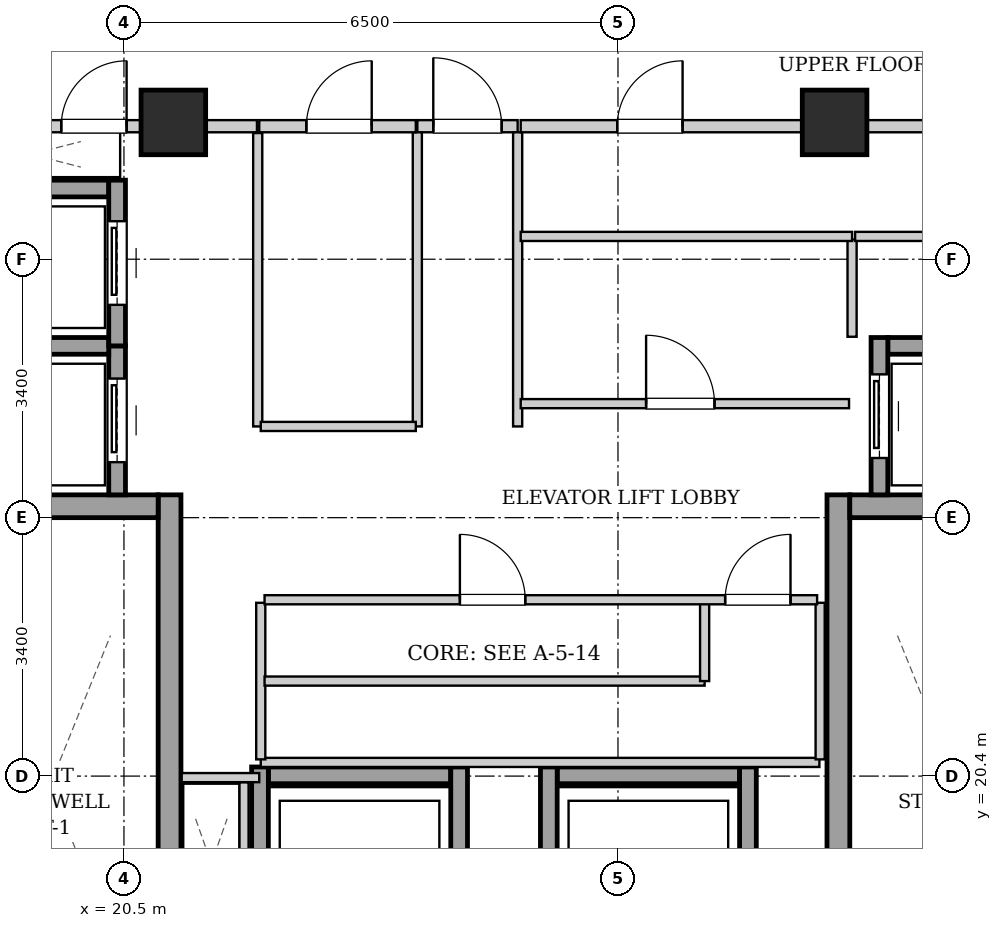
"""IFC4 building model, lengths in metres.
Left out: names, types, materials, properties, quantities, classifications, styles, units other than length and angle.
Written with IfcOpenShell. Run it as: python <this file> out.ifc"""

import sys

from ifc_helpers import new_model, si_unit, direction, frame, frame_2d, origin, origin_2d, place, context, subcontext, project, spatial, rectangle, extrude, element, fill, save


model = new_model("IFC4")
c1 = context("Model", 3, precision=1e-05, world=origin(), true_north=direction((0.0, 1.0)))
c2 = subcontext(c1, "Body", "Model", "MODEL_VIEW")
j1 = project(units=[si_unit("LENGTHUNIT", "METRE"), si_unit("PLANEANGLEUNIT", "RADIAN")], contexts=[c1])
p1 = place(None, origin())
s1 = spatial("IfcSite", under=j1, at=p1, CompositionType="ELEMENT")
p2 = place(p1, origin())
s2 = spatial("IfcBuilding", under=s1, at=p2, CompositionType="ELEMENT")
p3 = place(p2, frame((0.0, 0.0, 200.8)))
s3 = spatial("IfcBuildingStorey", under=s2, at=p3, CompositionType="ELEMENT", Elevation=200.8)
for number, where, z_axis, x_axis in (
    (1, (21.15, 29.0, 0.0), (0.0, 0.0, 1.0), (1.0, 0.0, 0.0)),
    (2, (29.85, 29.0, 0.0), (0.0, 0.0, 1.0), (1.0, 0.0, 0.0)),
):
    element("IfcColumn", number, at=place(p3, frame(where, z_axis=z_axis, x_axis=x_axis)), inside=s3, PredefinedType="COLUMN", context=c2, shape_type="SweptSolid", body=[
        extrude(rectangle(XDim=0.85, YDim=0.85, at=origin_2d()), origin(), (0.0, 0.0, 1.0), 3.3),
    ])
p4 = place(p3, frame((21.1, 15.1, 0.0), z_axis=(0.0, 0.0, 1.0), x_axis=(0.0, 1.0, 0.0)))
e3 = element("IfcWall", 3, at=p4, inside=s3, PredefinedType="SHEAR", context=c2, shape_type="SweptSolid", body=[
    extrude(rectangle(XDim=9.0, YDim=0.3, at=frame_2d((4.5, 0.0))), origin(), (0.0, 0.0, 1.0), 3.04),
])
p5 = place(p3, frame((18.1, 23.95, 0.0), z_axis=(0.0, 0.0, 1.0), x_axis=(1.0, 0.0, 0.0)))
e4 = element("IfcWall", 4, at=p5, inside=s3, PredefinedType="SHEAR", context=c2, shape_type="SweptSolid", body=[
    extrude(rectangle(XDim=2.85, YDim=0.3, at=frame_2d((1.425, 0.0))), origin(), (0.0, 0.0, 1.0), 3.04),
])
p6 = place(p3, frame((29.9, 15.1, 0.0), z_axis=(0.0, 0.0, 1.0), x_axis=(0.0, 1.0, 0.0)))
e5 = element("IfcWall", 5, at=p6, inside=s3, PredefinedType="SHEAR", context=c2, shape_type="SweptSolid", body=[
    extrude(rectangle(XDim=9.0, YDim=0.3, at=frame_2d((4.5, 0.0))), origin(), (0.0, 0.0, 1.0), 3.04),
])
p7 = place(p3, frame((30.05, 23.95, 0.0), z_axis=(0.0, 0.0, 1.0), x_axis=(1.0, 0.0, 0.0)))
e6 = element("IfcWall", 6, at=p7, inside=s3, PredefinedType="SHEAR", context=c2, shape_type="SweptSolid", body=[
    extrude(rectangle(XDim=2.85, YDim=0.3, at=frame_2d((1.425, 0.0))), origin(), (0.0, 0.0, 1.0), 3.04),
])
p8 = place(p3, frame((20.41, 24.1, 0.0), z_axis=(0.0, 0.0, 1.0), x_axis=(0.0, 1.0, 0.0)))
e7 = element("IfcWall", 7, at=p8, inside=s3, PredefinedType="SHEAR", context=c2, shape_type="SweptSolid", body=[
    extrude(rectangle(XDim=1.96, YDim=0.22, at=frame_2d((0.98, 0.0))), origin(), (0.0, 0.0, 1.0), 3.04),
])
p9 = place(p8, frame((0.43, 0.0, 0.0)))
e8 = element("IfcOpeningElement", 8, at=p9, cuts=e7, PredefinedType="OPENING", context=c2, shape_type="SweptSolid", body=[
    extrude(rectangle(XDim=1.1, YDim=2.15, at=frame_2d((0.55, 1.075))), frame((0.0, 0.12, 0.0), z_axis=(0.0, -1.0, 0.0), x_axis=(1.0, 0.0, 0.0)), (0.0, 0.0, 1.0), 0.24),
])
for number, where, z_axis, x_axis in (
    (9, (18.4, 26.06, 0.0), (0.0, 0.0, 1.0), (1.0, 0.0, 0.0)),
    (10, (18.4, 28.13, 0.0), (0.0, 0.0, 1.0), (1.0, 0.0, 0.0)),
):
    element("IfcWall", number, at=place(p3, frame(where, z_axis=z_axis, x_axis=x_axis)), inside=s3, PredefinedType="SHEAR", context=c2, shape_type="SweptSolid", body=[
        extrude(rectangle(XDim=1.9, YDim=0.22, at=frame_2d((0.95, 0.0))), origin(), (0.0, 0.0, 1.0), 3.04),
    ])
p10 = place(p3, frame((20.41, 26.06, 0.0), z_axis=(0.0, 0.0, 1.0), x_axis=(0.0, 1.0, 0.0)))
e11 = element("IfcWall", 11, at=p10, inside=s3, PredefinedType="SHEAR", context=c2, shape_type="SweptSolid", body=[
    extrude(rectangle(XDim=2.18, YDim=0.22, at=frame_2d((1.09, 0.0))), origin(), (0.0, 0.0, 1.0), 3.04),
])
p11 = place(p10, frame((0.54, 0.0, 0.0)))
e12 = element("IfcOpeningElement", 12, at=p11, cuts=e11, PredefinedType="OPENING", context=c2, shape_type="SweptSolid", body=[
    extrude(rectangle(XDim=1.1, YDim=2.15, at=frame_2d((0.55, 1.075))), frame((0.0, 0.12, 0.0), z_axis=(0.0, -1.0, 0.0), x_axis=(1.0, 0.0, 0.0)), (0.0, 0.0, 1.0), 0.24),
])
p12 = place(p3, frame((30.55, 26.06, 0.0), z_axis=(0.0, 0.0, 1.0), x_axis=(1.0, 0.0, 0.0)))
e13 = element("IfcWall", 13, at=p12, inside=s3, PredefinedType="SHEAR", context=c2, shape_type="SweptSolid", body=[
    extrude(rectangle(XDim=1.9, YDim=0.22, at=frame_2d((0.95, 0.0))), origin(), (0.0, 0.0, 1.0), 3.04),
])
p13 = place(p3, frame((30.44, 24.1, 0.0), z_axis=(0.0, 0.0, 1.0), x_axis=(0.0, 1.0, 0.0)))
e14 = element("IfcWall", 14, at=p13, inside=s3, PredefinedType="SHEAR", context=c2, shape_type="SweptSolid", body=[
    extrude(rectangle(XDim=2.07, YDim=0.22, at=frame_2d((1.035, 0.0))), origin(), (0.0, 0.0, 1.0), 3.04),
])
p14 = place(p13, frame((0.485, 0.0, 0.0)))
e15 = element("IfcOpeningElement", 15, at=p14, cuts=e14, PredefinedType="OPENING", context=c2, shape_type="SweptSolid", body=[
    extrude(rectangle(XDim=1.1, YDim=2.15, at=frame_2d((0.55, 1.075))), frame((0.0, 0.12, 0.0), z_axis=(0.0, -1.0, 0.0), x_axis=(1.0, 0.0, 0.0)), (0.0, 0.0, 1.0), 0.24),
])
p15 = place(p3, frame((22.4, 20.41, 0.0), z_axis=(0.0, 0.0, 1.0), x_axis=(1.0, 0.0, 0.0)))
e16 = element("IfcWall", 16, at=p15, inside=s3, PredefinedType="SHEAR", context=c2, shape_type="SweptSolid", body=[
    extrude(rectangle(XDim=2.4, YDim=0.22, at=frame_2d((1.2, 0.0))), origin(), (0.0, 0.0, 1.0), 3.04),
])
for number, where, z_axis, x_axis in (
    (17, (22.29, 17.98, 0.0), (0.0, 0.0, 1.0), (0.0, 1.0, 0.0)),
    (18, (24.91, 17.98, 0.0), (0.0, 0.0, 1.0), (0.0, 1.0, 0.0)),
):
    element("IfcWall", number, at=place(p3, frame(where, z_axis=z_axis, x_axis=x_axis)), inside=s3, PredefinedType="SHEAR", context=c2, shape_type="SweptSolid", body=[
        extrude(rectangle(XDim=2.54, YDim=0.22, at=frame_2d((1.27, 0.0))), origin(), (0.0, 0.0, 1.0), 3.04),
    ])
p16 = place(p3, frame((26.2, 20.41, 0.0), z_axis=(0.0, 0.0, 1.0), x_axis=(1.0, 0.0, 0.0)))
e19 = element("IfcWall", 19, at=p16, inside=s3, PredefinedType="SHEAR", context=c2, shape_type="SweptSolid", body=[
    extrude(rectangle(XDim=2.4, YDim=0.22, at=frame_2d((1.2, 0.0))), origin(), (0.0, 0.0, 1.0), 3.04),
])
for number, where, z_axis, x_axis in (
    (20, (26.09, 17.98, 0.0), (0.0, 0.0, 1.0), (0.0, 1.0, 0.0)),
    (21, (28.71, 17.98, 0.0), (0.0, 0.0, 1.0), (0.0, 1.0, 0.0)),
):
    element("IfcWall", number, at=place(p3, frame(where, z_axis=z_axis, x_axis=x_axis)), inside=s3, PredefinedType="SHEAR", context=c2, shape_type="SweptSolid", body=[
        extrude(rectangle(XDim=2.54, YDim=0.22, at=frame_2d((1.27, 0.0))), origin(), (0.0, 0.0, 1.0), 3.04),
    ])
p17 = place(p3, frame((24.36, 28.95, 0.0), z_axis=(0.0, 0.0, 1.0), x_axis=(1.0, 0.0, 0.0)))
e22 = element("IfcWall", 22, at=p17, inside=s3, PredefinedType="PARTITIONING", context=c2, shape_type="SweptSolid", body=[
    extrude(rectangle(XDim=1.32, YDim=0.16, at=frame_2d((0.66, 0.0))), origin(), (0.0, 0.0, 1.0), 2.556),
])
p18 = place(p17, frame((0.21, 0.0, 0.0)))
e23 = element("IfcOpeningElement", 23, at=p18, cuts=e22, PredefinedType="OPENING", context=c2, shape_type="SweptSolid", body=[
    extrude(rectangle(XDim=0.9, YDim=2.05, at=frame_2d((0.45, 1.025))), frame((0.0, 0.09, 0.0), z_axis=(0.0, -1.0, 0.0), x_axis=(1.0, 0.0, 0.0)), (0.0, 0.0, 1.0), 0.18),
])
p19 = place(p3, frame((17.96, 28.95, 0.0), z_axis=(0.0, 0.0, 1.0), x_axis=(1.0, 0.0, 0.0)))
e24 = element("IfcWall", 24, at=p19, inside=s3, PredefinedType="PARTITIONING", context=c2, shape_type="SweptSolid", body=[
    extrude(rectangle(XDim=4.29, YDim=0.16, at=frame_2d((2.145, 0.0))), origin(), (0.0, 0.0, 1.0), 2.556),
])
p20 = place(p19, frame((1.715, 0.0, 0.0)))
e25 = element("IfcOpeningElement", 25, at=p20, cuts=e24, PredefinedType="OPENING", context=c2, shape_type="SweptSolid", body=[
    extrude(rectangle(XDim=0.86, YDim=2.05, at=frame_2d((0.43, 1.025))), frame((0.0, 0.09, 0.0), z_axis=(0.0, -1.0, 0.0), x_axis=(1.0, 0.0, 0.0)), (0.0, 0.0, 1.0), 0.18),
])
p21 = place(p3, frame((22.08, 18.2, 0.0), z_axis=(0.0, 0.0, 1.0), x_axis=(0.0, 1.0, 0.0)))
e26 = element("IfcWall", 26, at=p21, inside=s3, PredefinedType="PARTITIONING", context=c2, shape_type="SweptSolid", body=[
    extrude(rectangle(XDim=2.12, YDim=0.12, at=frame_2d((1.06, 0.0))), origin(), (0.0, 0.0, 1.0), 3.04),
])
p22 = place(p3, frame((22.28, 20.38, 0.0), z_axis=(0.0, 0.0, 1.0), x_axis=(-1.0, 0.0, 0.0)))
e27 = element("IfcWall", 27, at=p22, inside=s3, PredefinedType="PARTITIONING", context=c2, shape_type="SweptSolid", body=[
    extrude(rectangle(XDim=1.02, YDim=0.12, at=frame_2d((0.51, 0.0))), origin(), (0.0, 0.0, 1.0), 3.04),
])
for number, where, z_axis, x_axis in (
    (28, (24.36, 25.0, 0.0), (0.0, 0.0, 1.0), (0.0, 1.0, 0.0)),
    (29, (25.68, 25.0, 0.0), (0.0, 0.0, 1.0), (0.0, 1.0, 0.0)),
):
    element("IfcWall", number, at=place(p3, frame(where, z_axis=z_axis, x_axis=x_axis)), inside=s3, PredefinedType="PARTITIONING", context=c2, shape_type="SweptSolid", body=[
        extrude(rectangle(XDim=3.87, YDim=0.12, at=frame_2d((1.935, 0.0))), origin(), (0.0, 0.0, 1.0), 3.04),
    ])
p23 = place(p3, frame((30.08, 26.18, 0.0), z_axis=(0.0, 0.0, 1.0), x_axis=(0.0, 1.0, 0.0)))
e30 = element("IfcWall", 30, at=p23, inside=s3, PredefinedType="PARTITIONING", context=c2, shape_type="SweptSolid", body=[
    extrude(rectangle(XDim=1.28, YDim=0.12, at=frame_2d((0.64, 0.0))), origin(), (0.0, 0.0, 1.0), 3.04),
])
p24 = place(p3, frame((30.12, 27.5, 0.0), z_axis=(0.0, 0.0, 1.0), x_axis=(1.0, 0.0, 0.0)))
e31 = element("IfcWall", 31, at=p24, inside=s3, PredefinedType="PARTITIONING", context=c2, shape_type="SweptSolid", body=[
    extrude(rectangle(XDim=2.92, YDim=0.12, at=frame_2d((1.46, 0.0))), origin(), (0.0, 0.0, 1.0), 3.04),
])
p25 = place(p24, frame((0.97, 0.0, 0.0)))
e32 = element("IfcOpeningElement", 32, at=p25, cuts=e31, PredefinedType="OPENING", context=c2, shape_type="SweptSolid", body=[
    extrude(rectangle(XDim=0.86, YDim=2.05, at=frame_2d((0.43, 1.025))), frame((0.0, 0.07, 0.0), z_axis=(0.0, -1.0, 0.0), x_axis=(1.0, 0.0, 0.0)), (0.0, 0.0, 1.0), 0.14),
])
p26 = place(p3, frame((22.26, 25.0, 0.0), z_axis=(0.0, 0.0, 1.0), x_axis=(0.0, 1.0, 0.0)))
e33 = element("IfcWall", 33, at=p26, inside=s3, PredefinedType="PARTITIONING", context=c2, shape_type="SweptSolid", body=[
    extrude(rectangle(XDim=3.86, YDim=0.12, at=frame_2d((1.93, 0.0))), origin(), (0.0, 0.0, 1.0), 3.04),
])
p27 = place(p3, frame((22.3, 25.0, 0.0), z_axis=(0.0, 0.0, 1.0), x_axis=(1.0, 0.0, 0.0)))
e34 = element("IfcWall", 34, at=p27, inside=s3, PredefinedType="PARTITIONING", context=c2, shape_type="SweptSolid", body=[
    extrude(rectangle(XDim=2.04, YDim=0.12, at=frame_2d((1.02, 0.0))), origin(), (0.0, 0.0, 1.0), 3.04),
])
p28 = place(p3, frame((22.28, 28.95, 0.0), z_axis=(0.0, 0.0, 1.0), x_axis=(1.0, 0.0, 0.0)))
e35 = element("IfcWall", 35, at=p28, inside=s3, PredefinedType="PARTITIONING", context=c2, shape_type="SweptSolid", body=[
    extrude(rectangle(XDim=2.06, YDim=0.16, at=frame_2d((1.03, 0.0))), origin(), (0.0, 0.0, 1.0), 2.556),
])
p29 = place(p28, frame((0.62, 0.0, 0.0)))
e36 = element("IfcOpeningElement", 36, at=p29, cuts=e35, PredefinedType="OPENING", context=c2, shape_type="SweptSolid", body=[
    extrude(rectangle(XDim=0.86, YDim=2.05, at=frame_2d((0.43, 1.025))), frame((0.0, 0.09, 0.0), z_axis=(0.0, -1.0, 0.0), x_axis=(1.0, 0.0, 0.0)), (0.0, 0.0, 1.0), 0.18),
])
p30 = place(p3, frame((25.72, 27.5, 0.0), z_axis=(0.0, 0.0, 1.0), x_axis=(1.0, 0.0, 0.0)))
e37 = element("IfcWall", 37, at=p30, inside=s3, PredefinedType="PARTITIONING", context=c2, shape_type="SweptSolid", body=[
    extrude(rectangle(XDim=4.36, YDim=0.12, at=frame_2d((2.18, 0.0))), origin(), (0.0, 0.0, 1.0), 3.04),
])
p31 = place(p3, frame((25.72, 25.3, 0.0), z_axis=(0.0, 0.0, 1.0), x_axis=(1.0, 0.0, 0.0)))
e38 = element("IfcWall", 38, at=p31, inside=s3, PredefinedType="PARTITIONING", context=c2, shape_type="SweptSolid", body=[
    extrude(rectangle(XDim=4.32, YDim=0.12, at=frame_2d((2.16, 0.0))), origin(), (0.0, 0.0, 1.0), 3.04),
])
p32 = place(p31, frame((1.65, 0.0, 0.0)))
e39 = element("IfcOpeningElement", 39, at=p32, cuts=e38, PredefinedType="OPENING", context=c2, shape_type="SweptSolid", body=[
    extrude(rectangle(XDim=0.9, YDim=2.05, at=frame_2d((0.45, 1.025))), frame((0.0, 0.07, 0.0), z_axis=(0.0, -1.0, 0.0), x_axis=(1.0, 0.0, 0.0)), (0.0, 0.0, 1.0), 0.14),
])
p33 = place(p3, frame((25.72, 28.95, 0.0), z_axis=(0.0, 0.0, 1.0), x_axis=(1.0, 0.0, 0.0)))
e40 = element("IfcWall", 40, at=p33, inside=s3, PredefinedType="PARTITIONING", context=c2, shape_type="SweptSolid", body=[
    extrude(rectangle(XDim=7.32, YDim=0.16, at=frame_2d((3.66, 0.0))), origin(), (0.0, 0.0, 1.0), 2.556),
])
p34 = place(p33, frame((1.27, 0.0, 0.0)))
e41 = element("IfcOpeningElement", 41, at=p34, cuts=e40, PredefinedType="OPENING", context=c2, shape_type="SweptSolid", body=[
    extrude(rectangle(XDim=0.86, YDim=2.05, at=frame_2d((0.43, 1.025))), frame((0.0, 0.09, 0.0), z_axis=(0.0, -1.0, 0.0), x_axis=(1.0, 0.0, 0.0)), (0.0, 0.0, 1.0), 0.18),
])
p35 = place(p3, frame((22.3, 20.58, 0.0), z_axis=(0.0, 0.0, 1.0), x_axis=(1.0, 0.0, 0.0)))
e42 = element("IfcWall", 42, at=p35, inside=s3, PredefinedType="PARTITIONING", context=c2, shape_type="SweptSolid", body=[
    extrude(rectangle(XDim=7.35, YDim=0.12, at=frame_2d((3.675, 0.0))), origin(), (0.0, 0.0, 1.0), 3.04),
])
for number, where, z_axis, x_axis in (
    (43, (22.3, 20.62, 0.0), (0.0, 0.0, 1.0), (0.0, 1.0, 0.0)),
    (44, (29.66, 20.62, 0.0), (0.0, 0.0, 1.0), (0.0, 1.0, 0.0)),
):
    element("IfcWall", number, at=place(p3, frame(where, z_axis=z_axis, x_axis=x_axis)), inside=s3, PredefinedType="PARTITIONING", context=c2, shape_type="SweptSolid", body=[
        extrude(rectangle(XDim=2.06, YDim=0.12, at=frame_2d((1.03, 0.0))), origin(), (0.0, 0.0, 1.0), 3.04),
    ])
p36 = place(p3, frame((22.35, 21.65, 0.0), z_axis=(0.0, 0.0, 1.0), x_axis=(1.0, 0.0, 0.0)))
e45 = element("IfcWall", 45, at=p36, inside=s3, PredefinedType="PARTITIONING", context=c2, shape_type="SweptSolid", body=[
    extrude(rectangle(XDim=5.79, YDim=0.12, at=frame_2d((2.895, 0.0))), origin(), (0.0, 0.0, 1.0), 3.04),
])
p37 = place(p3, frame((28.14, 21.65, 0.0), z_axis=(0.0, 0.0, 1.0), x_axis=(0.0, 1.0, 0.0)))
e46 = element("IfcWall", 46, at=p37, inside=s3, PredefinedType="PARTITIONING", context=c2, shape_type="SweptSolid", body=[
    extrude(rectangle(XDim=1.03, YDim=0.12, at=frame_2d((0.515, 0.0))), origin(), (0.0, 0.0, 1.0), 3.04),
])
p38 = place(p3, frame((22.35, 22.72, 0.0), z_axis=(0.0, 0.0, 1.0), x_axis=(1.0, 0.0, 0.0)))
e47 = element("IfcWall", 47, at=p38, inside=s3, PredefinedType="PARTITIONING", context=c2, shape_type="SweptSolid", body=[
    extrude(rectangle(XDim=7.27, YDim=0.12, at=frame_2d((3.635, 0.0))), origin(), (0.0, 0.0, 1.0), 3.04),
])
p39 = place(p38, frame((2.57, 0.0, 0.0)))
e48 = element("IfcOpeningElement", 48, at=p39, cuts=e47, PredefinedType="OPENING", context=c2, shape_type="SweptSolid", body=[
    extrude(rectangle(XDim=0.86, YDim=2.05, at=frame_2d((0.43, 1.025))), frame((0.0, 0.07, 0.0), z_axis=(0.0, -1.0, 0.0), x_axis=(1.0, 0.0, 0.0)), (0.0, 0.0, 1.0), 0.14),
])
p40 = place(p38, frame((6.06, 0.0, 0.0)))
e49 = element("IfcOpeningElement", 49, at=p40, cuts=e47, PredefinedType="OPENING", context=c2, shape_type="SweptSolid", body=[
    extrude(rectangle(XDim=0.86, YDim=2.05, at=frame_2d((0.43, 1.025))), frame((0.0, 0.07, 0.0), z_axis=(0.0, -1.0, 0.0), x_axis=(1.0, 0.0, 0.0)), (0.0, 0.0, 1.0), 0.14),
])
p41 = place(p9, origin())
e50 = element("IfcDoor", 50, at=p41, inside=s3, OperationType="SLIDING_TO_LEFT", PredefinedType="DOOR", context=c2, shape_type="SweptSolid", body=[
    extrude(rectangle(XDim=1.1, YDim=2.15, at=frame_2d((0.55, 1.075))), frame((0.0, 0.025, 0.0), z_axis=(0.0, -1.0, 0.0), x_axis=(1.0, 0.0, 0.0)), (0.0, 0.0, 1.0), 0.05),
])
fill(e8, e50)
p42 = place(p11, origin())
e51 = element("IfcDoor", 51, at=p42, inside=s3, OperationType="SLIDING_TO_LEFT", PredefinedType="DOOR", context=c2, shape_type="SweptSolid", body=[
    extrude(rectangle(XDim=1.1, YDim=2.15, at=frame_2d((0.55, 1.075))), frame((0.0, 0.025, 0.0), z_axis=(0.0, -1.0, 0.0), x_axis=(1.0, 0.0, 0.0)), (0.0, 0.0, 1.0), 0.05),
])
fill(e12, e51)
p43 = place(p14, origin())
e52 = element("IfcDoor", 52, at=p43, inside=s3, OperationType="SLIDING_TO_LEFT", PredefinedType="DOOR", context=c2, shape_type="SweptSolid", body=[
    extrude(rectangle(XDim=1.1, YDim=2.15, at=frame_2d((0.55, 1.075))), frame((0.0, 0.025, 0.0), z_axis=(0.0, -1.0, 0.0), x_axis=(1.0, 0.0, 0.0)), (0.0, 0.0, 1.0), 0.05),
])
fill(e15, e52)
p44 = place(p18, origin())
e53 = element("IfcDoor", 53, at=p44, inside=s3, OperationType="SINGLE_SWING_LEFT", PredefinedType="DOOR", context=c2, shape_type="SweptSolid", body=[
    extrude(rectangle(XDim=0.9, YDim=2.05, at=frame_2d((0.45, 1.025))), frame((0.0, 0.025, 0.0), z_axis=(0.0, -1.0, 0.0), x_axis=(1.0, 0.0, 0.0)), (0.0, 0.0, 1.0), 0.05),
])
fill(e23, e53)
p45 = place(p20, origin())
e54 = element("IfcDoor", 54, at=p45, inside=s3, OperationType="SINGLE_SWING_RIGHT", PredefinedType="DOOR", context=c2, shape_type="SweptSolid", body=[
    extrude(rectangle(XDim=0.86, YDim=2.05, at=frame_2d((0.43, 1.025))), frame((0.0, 0.025, 0.0), z_axis=(0.0, -1.0, 0.0), x_axis=(1.0, 0.0, 0.0)), (0.0, 0.0, 1.0), 0.05),
])
fill(e25, e54)
p46 = place(p29, origin())
e55 = element("IfcDoor", 55, at=p46, inside=s3, OperationType="SINGLE_SWING_RIGHT", PredefinedType="DOOR", context=c2, shape_type="SweptSolid", body=[
    extrude(rectangle(XDim=0.86, YDim=2.05, at=frame_2d((0.43, 1.025))), frame((0.0, 0.025, 0.0), z_axis=(0.0, -1.0, 0.0), x_axis=(1.0, 0.0, 0.0)), (0.0, 0.0, 1.0), 0.05),
])
fill(e36, e55)
p47 = place(p32, origin())
e56 = element("IfcDoor", 56, at=p47, inside=s3, OperationType="SINGLE_SWING_LEFT", PredefinedType="DOOR", context=c2, shape_type="SweptSolid", body=[
    extrude(rectangle(XDim=0.9, YDim=2.05, at=frame_2d((0.45, 1.025))), frame((0.0, 0.025, 0.0), z_axis=(0.0, -1.0, 0.0), x_axis=(1.0, 0.0, 0.0)), (0.0, 0.0, 1.0), 0.05),
])
fill(e39, e56)
p48 = place(p34, origin())
e57 = element("IfcDoor", 57, at=p48, inside=s3, OperationType="SINGLE_SWING_RIGHT", PredefinedType="DOOR", context=c2, shape_type="SweptSolid", body=[
    extrude(rectangle(XDim=0.86, YDim=2.05, at=frame_2d((0.43, 1.025))), frame((0.0, 0.025, 0.0), z_axis=(0.0, -1.0, 0.0), x_axis=(1.0, 0.0, 0.0)), (0.0, 0.0, 1.0), 0.05),
])
fill(e41, e57)
p49 = place(p39, origin())
e58 = element("IfcDoor", 58, at=p49, inside=s3, OperationType="SINGLE_SWING_LEFT", PredefinedType="DOOR", context=c2, shape_type="SweptSolid", body=[
    extrude(rectangle(XDim=0.86, YDim=2.05, at=frame_2d((0.43, 1.025))), frame((0.0, 0.025, 0.0), z_axis=(0.0, -1.0, 0.0), x_axis=(1.0, 0.0, 0.0)), (0.0, 0.0, 1.0), 0.05),
])
fill(e48, e58)
p50 = place(p40, origin())
e59 = element("IfcDoor", 59, at=p50, inside=s3, OperationType="SINGLE_SWING_RIGHT", PredefinedType="DOOR", context=c2, shape_type="SweptSolid", body=[
    extrude(rectangle(XDim=0.86, YDim=2.05, at=frame_2d((0.43, 1.025))), frame((0.0, 0.025, 0.0), z_axis=(0.0, -1.0, 0.0), x_axis=(1.0, 0.0, 0.0)), (0.0, 0.0, 1.0), 0.05),
])
fill(e49, e59)
save(model, sys.argv[1])
